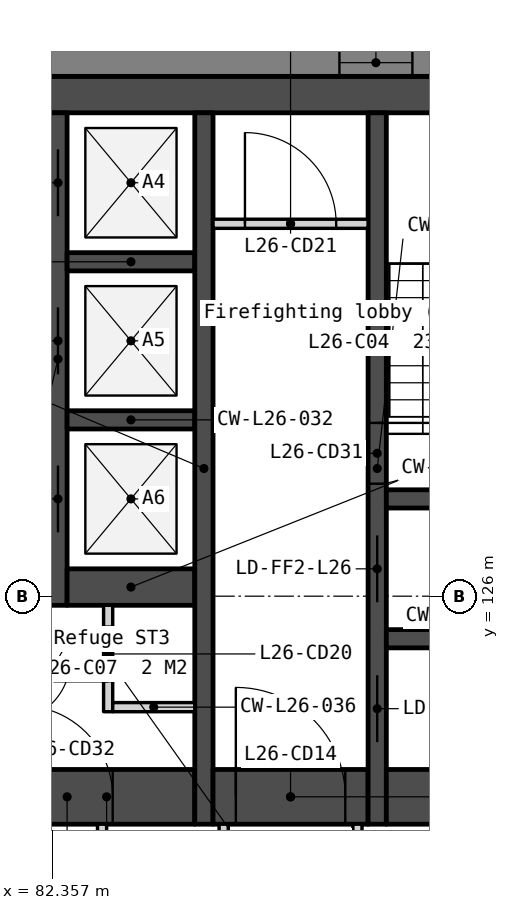
"""IFC4 building model, lengths in metres.
Left out: names, types, materials, properties, quantities, classifications, styles, units other than length and angle.
Written with IfcOpenShell. Run it as: python <this file> out.ifc"""

import sys

from ifc_helpers import new_model, si_unit, direction, frame, frame_2d, origin, place, context, subcontext, project, spatial, polyline, rectangle, outline, extrude, element, fill, save


model = new_model("IFC4")
c1 = context("Model", 3, precision=1e-05, world=origin(), true_north=direction((0.0, 1.0)))
c2 = subcontext(c1, "Body", "Model", "MODEL_VIEW")
j1 = project(units=[si_unit("LENGTHUNIT", "METRE"), si_unit("PLANEANGLEUNIT", "RADIAN")], contexts=[c1])
p1 = place(None, origin())
s1 = spatial("IfcSite", under=j1, at=p1, CompositionType="ELEMENT")
p2 = place(p1, origin())
s2 = spatial("IfcBuilding", under=s1, at=p2, CompositionType="ELEMENT")
p3 = place(p2, frame((0.0, 0.0, 106.3)))
s3 = spatial("IfcBuildingStorey", under=s2, at=p3, CompositionType="ELEMENT", Elevation=106.3)
p4 = place(p3, frame((66.0, 134.25, 0.0), z_axis=(0.0, 0.0, 1.0), x_axis=(1.0, 0.0, 0.0)))
e1 = element("IfcWall", 1, at=p4, inside=s3, PredefinedType="SOLIDWALL", context=c2, shape_type="SweptSolid", body=[
    extrude(rectangle(XDim=28.0, YDim=0.6, at=frame_2d((14.0, 0.0))), origin(), (0.0, 0.0, 1.0), 3.35),
])
p5 = place(p3, frame((81.8, 122.7, 0.0), z_axis=(0.0, 0.0, 1.0), x_axis=(1.0, 0.0, 0.0)))
e2 = element("IfcWall", 2, at=p5, inside=s3, PredefinedType="SOLIDWALL", context=c2, shape_type="SweptSolid", body=[
    extrude(rectangle(XDim=2.9, YDim=0.9, at=frame_2d((1.45, 0.0))), origin(), (0.0, 0.0, 1.0), 3.35),
])
p6 = place(p5, frame((0.05, 0.0, 0.0)))
e3 = element("IfcOpeningElement", 3, at=p6, cuts=e2, PredefinedType="OPENING", context=c2, shape_type="SweptSolid", body=[
    extrude(rectangle(XDim=1.5, YDim=2.1, at=frame_2d((0.75, 1.05))), frame((0.0, 0.46, 0.0), z_axis=(0.0, -1.0, 0.0), x_axis=(1.0, 0.0, 0.0)), (0.0, 0.0, 1.0), 0.92),
])
p7 = place(p3, frame((82.45, 133.95, 0.0), z_axis=(0.0, 0.0, 1.0), x_axis=(0.0, -1.0, 0.0)))
e4 = element("IfcWall", 4, at=p7, inside=s3, PredefinedType="SOLIDWALL", context=c2, shape_type="SweptSolid", body=[
    extrude(rectangle(XDim=8.1, YDim=0.3, at=frame_2d((4.05, 0.0))), origin(), (0.0, 0.0, 1.0), 3.35),
])
p8 = place(p7, frame((0.6, 0.0, 0.0)))
e5 = element("IfcOpeningElement", 5, at=p8, cuts=e4, PredefinedType="OPENING", context=c2, shape_type="SweptSolid", body=[
    extrude(rectangle(XDim=1.1, YDim=2.1, at=frame_2d((0.55, 1.05))), frame((0.0, 0.16, 0.0), z_axis=(0.0, -1.0, 0.0), x_axis=(1.0, 0.0, 0.0)), (0.0, 0.0, 1.0), 0.32),
])
p9 = place(p7, frame((3.2, 0.0, 0.0)))
e6 = element("IfcOpeningElement", 6, at=p9, cuts=e4, PredefinedType="OPENING", context=c2, shape_type="SweptSolid", body=[
    extrude(rectangle(XDim=1.1, YDim=2.1, at=frame_2d((0.55, 1.05))), frame((0.0, 0.16, 0.0), z_axis=(0.0, -1.0, 0.0), x_axis=(1.0, 0.0, 0.0)), (0.0, 0.0, 1.0), 0.32),
])
p10 = place(p7, frame((5.8, 0.0, 0.0)))
e7 = element("IfcOpeningElement", 7, at=p10, cuts=e4, PredefinedType="OPENING", context=c2, shape_type="SweptSolid", body=[
    extrude(rectangle(XDim=1.1, YDim=2.1, at=frame_2d((0.55, 1.05))), frame((0.0, 0.16, 0.0), z_axis=(0.0, -1.0, 0.0), x_axis=(1.0, 0.0, 0.0)), (0.0, 0.0, 1.0), 0.32),
])
for number, where, z_axis, x_axis in (
    (8, (82.6, 131.5, 0.0), (0.0, 0.0, 1.0), (1.0, 0.0, 0.0)),
    (9, (82.6, 128.9, 0.0), (0.0, 0.0, 1.0), (1.0, 0.0, 0.0)),
):
    element("IfcWall", number, at=place(p3, frame(where, z_axis=z_axis, x_axis=x_axis)), inside=s3, PredefinedType="SOLIDWALL", context=c2, shape_type="SweptSolid", body=[
        extrude(rectangle(XDim=2.1, YDim=0.3, at=frame_2d((1.05, 0.0))), origin(), (0.0, 0.0, 1.0), 3.35),
    ])
p11 = place(p3, frame((82.6, 126.15, 0.0), z_axis=(0.0, 0.0, 1.0), x_axis=(1.0, 0.0, 0.0)))
e10 = element("IfcWall", 10, at=p11, inside=s3, PredefinedType="SOLIDWALL", context=c2, shape_type="SweptSolid", body=[
    extrude(rectangle(XDim=2.1, YDim=0.6, at=frame_2d((1.05, 0.0))), origin(), (0.0, 0.0, 1.0), 3.35),
])
p12 = place(p3, frame((83.175, 122.25, 0.0), z_axis=(0.0, 0.0, 1.0), x_axis=(0.0, -1.0, 0.0)))
e11 = element("IfcWall", 11, at=p12, inside=s3, PredefinedType="PARTITIONING", context=c2, shape_type="SweptSolid", body=[
    extrude(rectangle(XDim=2.1, YDim=0.15, at=frame_2d((1.05, 0.0))), origin(), (0.0, 0.0, 1.0), 3.35),
])
p13 = place(p3, frame((83.275, 125.85, 0.0), z_axis=(0.0, 0.0, 1.0), x_axis=(0.0, -1.0, 0.0)))
e12 = element("IfcWall", 12, at=p13, inside=s3, PredefinedType="PARTITIONING", context=c2, shape_type="SweptSolid", body=[
    extrude(rectangle(XDim=1.75, YDim=0.15, at=frame_2d((0.875, 0.0))), origin(), (0.0, 0.0, 1.0), 3.35),
])
p14 = place(p13, frame((0.35, 0.0, 0.0)))
e13 = element("IfcOpeningElement", 13, at=p14, cuts=e12, PredefinedType="OPENING", context=c2, shape_type="SweptSolid", body=[
    extrude(rectangle(XDim=0.9, YDim=2.1, at=frame_2d((0.45, 1.05))), frame((0.0, 0.085, 0.0), z_axis=(0.0, -1.0, 0.0), x_axis=(1.0, 0.0, 0.0)), (0.0, 0.0, 1.0), 0.17),
])
p15 = place(p3, frame((83.35, 124.175, 0.0), z_axis=(0.0, 0.0, 1.0), x_axis=(1.0, 0.0, 0.0)))
e14 = element("IfcWall", 14, at=p15, inside=s3, PredefinedType="PARTITIONING", context=c2, shape_type="SweptSolid", body=[
    extrude(rectangle(XDim=1.35, YDim=0.15, at=frame_2d((0.675, 0.0))), origin(), (0.0, 0.0, 1.0), 3.35),
])
p16 = place(p3, frame((84.85, 133.95, 0.0), z_axis=(0.0, 0.0, 1.0), x_axis=(0.0, -1.0, 0.0)))
e15 = element("IfcWall", 15, at=p16, inside=s3, PredefinedType="SOLIDWALL", context=c2, shape_type="SweptSolid", body=[
    extrude(rectangle(XDim=11.7, YDim=0.3, at=frame_2d((5.85, 0.0))), origin(), (0.0, 0.0, 1.0), 3.35),
])
p17 = place(p3, frame((85.0, 132.125, 0.0), z_axis=(0.0, 0.0, 1.0), x_axis=(1.0, 0.0, 0.0)))
e16 = element("IfcWall", 16, at=p17, inside=s3, PredefinedType="PARTITIONING", context=c2, shape_type="SweptSolid", body=[
    extrude(rectangle(XDim=2.55, YDim=0.15, at=frame_2d((1.275, 0.0))), origin(), (0.0, 0.0, 1.0), 3.35),
])
p18 = place(p17, frame((0.525, 0.0, 0.0)))
e17 = element("IfcOpeningElement", 17, at=p18, cuts=e16, PredefinedType="OPENING", context=c2, shape_type="SweptSolid", body=[
    extrude(rectangle(XDim=1.5, YDim=2.1, at=frame_2d((0.75, 1.05))), frame((0.0, 0.085, 0.0), z_axis=(0.0, -1.0, 0.0), x_axis=(1.0, 0.0, 0.0)), (0.0, 0.0, 1.0), 0.17),
])
p19 = place(p3, frame((85.0, 122.7, 0.0), z_axis=(0.0, 0.0, 1.0), x_axis=(1.0, 0.0, 0.0)))
e18 = element("IfcWall", 18, at=p19, inside=s3, PredefinedType="SOLIDWALL", context=c2, shape_type="SweptSolid", body=[
    extrude(rectangle(XDim=2.55, YDim=0.9, at=frame_2d((1.275, 0.0))), origin(), (0.0, 0.0, 1.0), 3.35),
])
p20 = place(p19, frame((0.375, 0.0, 0.0)))
e19 = element("IfcOpeningElement", 19, at=p20, cuts=e18, PredefinedType="OPENING", context=c2, shape_type="SweptSolid", body=[
    extrude(rectangle(XDim=1.8, YDim=2.1, at=frame_2d((0.9, 1.05))), frame((0.0, 0.46, 0.0), z_axis=(0.0, -1.0, 0.0), x_axis=(1.0, 0.0, 0.0)), (0.0, 0.0, 1.0), 0.92),
])
p21 = place(p3, frame((85.175, 122.25, 0.0), z_axis=(0.0, 0.0, 1.0), x_axis=(0.0, -1.0, 0.0)))
e20 = element("IfcWall", 20, at=p21, inside=s3, PredefinedType="PARTITIONING", context=c2, shape_type="SweptSolid", body=[
    extrude(rectangle(XDim=2.1, YDim=0.15, at=frame_2d((1.05, 0.0))), origin(), (0.0, 0.0, 1.0), 3.35),
])
p22 = place(p21, frame((0.55, 0.0, 0.0)))
e21 = element("IfcOpeningElement", 21, at=p22, cuts=e20, PredefinedType="OPENING", context=c2, shape_type="SweptSolid", body=[
    extrude(rectangle(XDim=1.0, YDim=2.1, at=frame_2d((0.5, 1.05))), frame((0.0, 0.085, 0.0), z_axis=(0.0, -1.0, 0.0), x_axis=(1.0, 0.0, 0.0)), (0.0, 0.0, 1.0), 0.17),
])
p23 = place(p3, frame((87.375, 122.25, 0.0), z_axis=(0.0, 0.0, 1.0), x_axis=(0.0, -1.0, 0.0)))
e22 = element("IfcWall", 22, at=p23, inside=s3, PredefinedType="PARTITIONING", context=c2, shape_type="SweptSolid", body=[
    extrude(rectangle(XDim=2.1, YDim=0.15, at=frame_2d((1.05, 0.0))), origin(), (0.0, 0.0, 1.0), 3.35),
])
p24 = place(p3, frame((87.7, 133.95, 0.0), z_axis=(0.0, 0.0, 1.0), x_axis=(0.0, -1.0, 0.0)))
e23 = element("IfcWall", 23, at=p24, inside=s3, PredefinedType="SOLIDWALL", context=c2, shape_type="SweptSolid", body=[
    extrude(rectangle(XDim=11.7, YDim=0.3, at=frame_2d((5.85, 0.0))), origin(), (0.0, 0.0, 1.0), 3.35),
])
p25 = place(p24, frame((6.95, 0.0, 0.0)))
e24 = element("IfcOpeningElement", 24, at=p25, cuts=e23, PredefinedType="OPENING", context=c2, shape_type="SweptSolid", body=[
    extrude(rectangle(XDim=1.1, YDim=2.1, at=frame_2d((0.55, 1.05))), frame((0.0, 0.16, 0.0), z_axis=(0.0, -1.0, 0.0), x_axis=(1.0, 0.0, 0.0)), (0.0, 0.0, 1.0), 0.32),
])
p26 = place(p24, frame((5.1, 0.0, 0.0)))
e25 = element("IfcOpeningElement", 25, at=p26, cuts=e23, PredefinedType="OPENING", context=c2, shape_type="SweptSolid", body=[
    extrude(rectangle(XDim=1.0, YDim=2.1, at=frame_2d((0.5, 1.05))), frame((0.0, 0.16, 0.0), z_axis=(0.0, -1.0, 0.0), x_axis=(1.0, 0.0, 0.0)), (0.0, 0.0, 1.0), 0.32),
])
p27 = place(p24, frame((9.25, 0.0, 0.0)))
e26 = element("IfcOpeningElement", 26, at=p27, cuts=e23, PredefinedType="OPENING", context=c2, shape_type="SweptSolid", body=[
    extrude(rectangle(XDim=1.1, YDim=2.1, at=frame_2d((0.55, 1.05))), frame((0.0, 0.16, 0.0), z_axis=(0.0, -1.0, 0.0), x_axis=(1.0, 0.0, 0.0)), (0.0, 0.0, 1.0), 0.32),
])
for number, where, z_axis, x_axis in (
    (27, (87.85, 127.6, 0.0), (0.0, 0.0, 1.0), (1.0, 0.0, 0.0)),
    (28, (87.85, 125.3, 0.0), (0.0, 0.0, 1.0), (1.0, 0.0, 0.0)),
):
    element("IfcWall", number, at=place(p3, frame(where, z_axis=z_axis, x_axis=x_axis)), inside=s3, PredefinedType="SOLIDWALL", context=c2, shape_type="SweptSolid", body=[
        extrude(rectangle(XDim=2.55, YDim=0.3, at=frame_2d((1.275, 0.0))), origin(), (0.0, 0.0, 1.0), 3.35),
    ])
p28 = place(p3, frame((87.85, 122.7, 0.0), z_axis=(0.0, 0.0, 1.0), x_axis=(1.0, 0.0, 0.0)))
e29 = element("IfcWall", 29, at=p28, inside=s3, PredefinedType="SOLIDWALL", context=c2, shape_type="SweptSolid", body=[
    extrude(rectangle(XDim=2.55, YDim=0.9, at=frame_2d((1.275, 0.0))), origin(), (0.0, 0.0, 1.0), 3.35),
])
p29 = place(p3, frame((101.322, 134.775, -0.15), z_axis=(0.0, 0.0, 1.0), x_axis=(-1.0, 0.0, 0.0)))
e30 = element("IfcWall", 30, at=p29, inside=s3, PredefinedType="SOLIDWALL", context=c2, shape_type="SweptSolid", body=[
    extrude(outline(polyline([(42.643, 0.0), (42.643, 3.5), (0.0, 3.5), (0.0, 0.0), (42.643, 0.0)])), frame((0.0, 0.225, 0.0), z_axis=(0.0, -1.0, 0.0), x_axis=(1.0, 0.0, 0.0)), (0.0, 0.0, 1.0), 0.45),
])
p30 = place(p29, frame((2.814, 0.0, 1.05)))
e31 = element("IfcOpeningElement", 31, at=p30, cuts=e30, PredefinedType="OPENING", context=c2, shape_type="SweptSolid", body=[
    extrude(rectangle(XDim=1.2, YDim=1.5, at=frame_2d((0.6, 0.75))), frame((0.0, 0.235, 0.0), z_axis=(0.0, -1.0, 0.0), x_axis=(1.0, 0.0, 0.0)), (0.0, 0.0, 1.0), 0.47),
])
p31 = place(p29, frame((4.514, 0.0, 1.05)))
e32 = element("IfcOpeningElement", 32, at=p31, cuts=e30, PredefinedType="OPENING", context=c2, shape_type="SweptSolid", body=[
    extrude(rectangle(XDim=1.2, YDim=1.5, at=frame_2d((0.6, 0.75))), frame((0.0, 0.235, 0.0), z_axis=(0.0, -1.0, 0.0), x_axis=(1.0, 0.0, 0.0)), (0.0, 0.0, 1.0), 0.47),
])
p32 = place(p29, frame((11.343, 0.0, 1.05)))
e33 = element("IfcOpeningElement", 33, at=p32, cuts=e30, PredefinedType="OPENING", context=c2, shape_type="SweptSolid", body=[
    extrude(rectangle(XDim=1.2, YDim=1.5, at=frame_2d((0.6, 0.75))), frame((0.0, 0.235, 0.0), z_axis=(0.0, -1.0, 0.0), x_axis=(1.0, 0.0, 0.0)), (0.0, 0.0, 1.0), 0.47),
])
p33 = place(p29, frame((13.043, 0.0, 1.05)))
e34 = element("IfcOpeningElement", 34, at=p33, cuts=e30, PredefinedType="OPENING", context=c2, shape_type="SweptSolid", body=[
    extrude(rectangle(XDim=1.2, YDim=1.5, at=frame_2d((0.6, 0.75))), frame((0.0, 0.235, 0.0), z_axis=(0.0, -1.0, 0.0), x_axis=(1.0, 0.0, 0.0)), (0.0, 0.0, 1.0), 0.47),
])
p34 = place(p29, frame((19.872, 0.0, 1.05)))
e35 = element("IfcOpeningElement", 35, at=p34, cuts=e30, PredefinedType="OPENING", context=c2, shape_type="SweptSolid", body=[
    extrude(rectangle(XDim=1.2, YDim=1.5, at=frame_2d((0.6, 0.75))), frame((0.0, 0.235, 0.0), z_axis=(0.0, -1.0, 0.0), x_axis=(1.0, 0.0, 0.0)), (0.0, 0.0, 1.0), 0.47),
])
p35 = place(p29, frame((21.572, 0.0, 1.05)))
e36 = element("IfcOpeningElement", 36, at=p35, cuts=e30, PredefinedType="OPENING", context=c2, shape_type="SweptSolid", body=[
    extrude(rectangle(XDim=1.2, YDim=1.5, at=frame_2d((0.6, 0.75))), frame((0.0, 0.235, 0.0), z_axis=(0.0, -1.0, 0.0), x_axis=(1.0, 0.0, 0.0)), (0.0, 0.0, 1.0), 0.47),
])
p36 = place(p29, frame((28.4, 0.0, 1.05)))
e37 = element("IfcOpeningElement", 37, at=p36, cuts=e30, PredefinedType="OPENING", context=c2, shape_type="SweptSolid", body=[
    extrude(rectangle(XDim=1.2, YDim=1.5, at=frame_2d((0.6, 0.75))), frame((0.0, 0.235, 0.0), z_axis=(0.0, -1.0, 0.0), x_axis=(1.0, 0.0, 0.0)), (0.0, 0.0, 1.0), 0.47),
])
p37 = place(p29, frame((30.1, 0.0, 1.05)))
e38 = element("IfcOpeningElement", 38, at=p37, cuts=e30, PredefinedType="OPENING", context=c2, shape_type="SweptSolid", body=[
    extrude(rectangle(XDim=1.2, YDim=1.5, at=frame_2d((0.6, 0.75))), frame((0.0, 0.235, 0.0), z_axis=(0.0, -1.0, 0.0), x_axis=(1.0, 0.0, 0.0)), (0.0, 0.0, 1.0), 0.47),
])
p38 = place(p29, frame((36.929, 0.0, 1.05)))
e39 = element("IfcOpeningElement", 39, at=p38, cuts=e30, PredefinedType="OPENING", context=c2, shape_type="SweptSolid", body=[
    extrude(rectangle(XDim=1.2, YDim=1.5, at=frame_2d((0.6, 0.75))), frame((0.0, 0.235, 0.0), z_axis=(0.0, -1.0, 0.0), x_axis=(1.0, 0.0, 0.0)), (0.0, 0.0, 1.0), 0.47),
])
p39 = place(p29, frame((38.629, 0.0, 1.05)))
e40 = element("IfcOpeningElement", 40, at=p39, cuts=e30, PredefinedType="OPENING", context=c2, shape_type="SweptSolid", body=[
    extrude(rectangle(XDim=1.2, YDim=1.5, at=frame_2d((0.6, 0.75))), frame((0.0, 0.235, 0.0), z_axis=(0.0, -1.0, 0.0), x_axis=(1.0, 0.0, 0.0)), (0.0, 0.0, 1.0), 0.47),
])
p40 = place(p3, frame((82.605, 93.333, -0.15), z_axis=(0.0, 0.0, 1.0), x_axis=(0.500000478905, 0.866025127289, 0.0)))
e41 = element("IfcWall", 41, at=p40, inside=s3, PredefinedType="SOLIDWALL", context=c2, shape_type="SweptSolid", body=[
    extrude(outline(polyline([(42.643, 0.0), (42.643, 3.5), (0.0, 3.5), (0.0, 0.0), (42.643, 0.0)])), frame((0.0, 0.225, 0.0), z_axis=(0.0, -1.0, 0.0), x_axis=(1.0, 0.0, 0.0)), (0.0, 0.0, 1.0), 0.45),
])
p41 = place(p40, frame((2.814, 0.0, 1.05)))
e42 = element("IfcOpeningElement", 42, at=p41, cuts=e41, PredefinedType="OPENING", context=c2, shape_type="SweptSolid", body=[
    extrude(rectangle(XDim=1.2, YDim=1.5, at=frame_2d((0.6, 0.75))), frame((0.0, 0.235, 0.0), z_axis=(0.0, -1.0, 0.0), x_axis=(1.0, 0.0, 0.0)), (0.0, 0.0, 1.0), 0.47),
])
p42 = place(p40, frame((4.514, 0.0, 1.05)))
e43 = element("IfcOpeningElement", 43, at=p42, cuts=e41, PredefinedType="OPENING", context=c2, shape_type="SweptSolid", body=[
    extrude(rectangle(XDim=1.2, YDim=1.5, at=frame_2d((0.6, 0.75))), frame((0.0, 0.235, 0.0), z_axis=(0.0, -1.0, 0.0), x_axis=(1.0, 0.0, 0.0)), (0.0, 0.0, 1.0), 0.47),
])
p43 = place(p40, frame((11.343, 0.0, 1.05)))
e44 = element("IfcOpeningElement", 44, at=p43, cuts=e41, PredefinedType="OPENING", context=c2, shape_type="SweptSolid", body=[
    extrude(rectangle(XDim=1.2, YDim=1.5, at=frame_2d((0.6, 0.75))), frame((0.0, 0.235, 0.0), z_axis=(0.0, -1.0, 0.0), x_axis=(1.0, 0.0, 0.0)), (0.0, 0.0, 1.0), 0.47),
])
p44 = place(p40, frame((13.043, 0.0, 1.05)))
e45 = element("IfcOpeningElement", 45, at=p44, cuts=e41, PredefinedType="OPENING", context=c2, shape_type="SweptSolid", body=[
    extrude(rectangle(XDim=1.2, YDim=1.5, at=frame_2d((0.6, 0.75))), frame((0.0, 0.235, 0.0), z_axis=(0.0, -1.0, 0.0), x_axis=(1.0, 0.0, 0.0)), (0.0, 0.0, 1.0), 0.47),
])
p45 = place(p40, frame((19.872, 0.0, 1.05)))
e46 = element("IfcOpeningElement", 46, at=p45, cuts=e41, PredefinedType="OPENING", context=c2, shape_type="SweptSolid", body=[
    extrude(rectangle(XDim=1.2, YDim=1.5, at=frame_2d((0.6, 0.75))), frame((0.0, 0.235, 0.0), z_axis=(0.0, -1.0, 0.0), x_axis=(1.0, 0.0, 0.0)), (0.0, 0.0, 1.0), 0.47),
])
p46 = place(p40, frame((21.572, 0.0, 1.05)))
e47 = element("IfcOpeningElement", 47, at=p46, cuts=e41, PredefinedType="OPENING", context=c2, shape_type="SweptSolid", body=[
    extrude(rectangle(XDim=1.2, YDim=1.5, at=frame_2d((0.6, 0.75))), frame((0.0, 0.235, 0.0), z_axis=(0.0, -1.0, 0.0), x_axis=(1.0, 0.0, 0.0)), (0.0, 0.0, 1.0), 0.47),
])
p47 = place(p40, frame((28.4, 0.0, 1.05)))
e48 = element("IfcOpeningElement", 48, at=p47, cuts=e41, PredefinedType="OPENING", context=c2, shape_type="SweptSolid", body=[
    extrude(rectangle(XDim=1.2, YDim=1.5, at=frame_2d((0.6, 0.75))), frame((0.0, 0.235, 0.0), z_axis=(0.0, -1.0, 0.0), x_axis=(1.0, 0.0, 0.0)), (0.0, 0.0, 1.0), 0.47),
])
p48 = place(p40, frame((30.1, 0.0, 1.05)))
e49 = element("IfcOpeningElement", 49, at=p48, cuts=e41, PredefinedType="OPENING", context=c2, shape_type="SweptSolid", body=[
    extrude(rectangle(XDim=1.2, YDim=1.5, at=frame_2d((0.6, 0.75))), frame((0.0, 0.235, 0.0), z_axis=(0.0, -1.0, 0.0), x_axis=(1.0, 0.0, 0.0)), (0.0, 0.0, 1.0), 0.47),
])
p49 = place(p40, frame((36.929, 0.0, 1.05)))
e50 = element("IfcOpeningElement", 50, at=p49, cuts=e41, PredefinedType="OPENING", context=c2, shape_type="SweptSolid", body=[
    extrude(rectangle(XDim=1.2, YDim=1.5, at=frame_2d((0.6, 0.75))), frame((0.0, 0.235, 0.0), z_axis=(0.0, -1.0, 0.0), x_axis=(1.0, 0.0, 0.0)), (0.0, 0.0, 1.0), 0.47),
])
p50 = place(p40, frame((38.629, 0.0, 1.05)))
e51 = element("IfcOpeningElement", 51, at=p50, cuts=e41, PredefinedType="OPENING", context=c2, shape_type="SweptSolid", body=[
    extrude(rectangle(XDim=1.2, YDim=1.5, at=frame_2d((0.6, 0.75))), frame((0.0, 0.235, 0.0), z_axis=(0.0, -1.0, 0.0), x_axis=(1.0, 0.0, 0.0)), (0.0, 0.0, 1.0), 0.47),
])
p51 = place(p8, origin())
e52 = element("IfcDoor", 52, at=p51, inside=s3, OperationType="SLIDING_TO_LEFT", PredefinedType="DOOR", context=c2, shape_type="SweptSolid", body=[
    extrude(rectangle(XDim=1.1, YDim=2.1, at=frame_2d((0.55, 1.05))), frame((0.0, 0.025, 0.0), z_axis=(0.0, -1.0, 0.0), x_axis=(1.0, 0.0, 0.0)), (0.0, 0.0, 1.0), 0.05),
])
fill(e5, e52)
p52 = place(p9, origin())
e53 = element("IfcDoor", 53, at=p52, inside=s3, OperationType="SLIDING_TO_LEFT", PredefinedType="DOOR", context=c2, shape_type="SweptSolid", body=[
    extrude(rectangle(XDim=1.1, YDim=2.1, at=frame_2d((0.55, 1.05))), frame((0.0, 0.025, 0.0), z_axis=(0.0, -1.0, 0.0), x_axis=(1.0, 0.0, 0.0)), (0.0, 0.0, 1.0), 0.05),
])
fill(e6, e53)
p53 = place(p10, origin())
e54 = element("IfcDoor", 54, at=p53, inside=s3, OperationType="SLIDING_TO_LEFT", PredefinedType="DOOR", context=c2, shape_type="SweptSolid", body=[
    extrude(rectangle(XDim=1.1, YDim=2.1, at=frame_2d((0.55, 1.05))), frame((0.0, 0.025, 0.0), z_axis=(0.0, -1.0, 0.0), x_axis=(1.0, 0.0, 0.0)), (0.0, 0.0, 1.0), 0.05),
])
fill(e7, e54)
p54 = place(p25, origin())
e55 = element("IfcDoor", 55, at=p54, inside=s3, OperationType="SLIDING_TO_LEFT", PredefinedType="DOOR", context=c2, shape_type="SweptSolid", body=[
    extrude(rectangle(XDim=1.1, YDim=2.1, at=frame_2d((0.55, 1.05))), frame((0.0, 0.025, 0.0), z_axis=(0.0, -1.0, 0.0), x_axis=(1.0, 0.0, 0.0)), (0.0, 0.0, 1.0), 0.05),
])
fill(e24, e55)
p55 = place(p20, origin())
e56 = element("IfcDoor", 56, at=p55, inside=s3, OperationType="DOUBLE_DOOR_DOUBLE_SWING", PredefinedType="DOOR", context=c2, shape_type="SweptSolid", body=[
    extrude(rectangle(XDim=1.8, YDim=2.1, at=frame_2d((0.9, 1.05))), frame((0.0, 0.025, 0.0), z_axis=(0.0, -1.0, 0.0), x_axis=(1.0, 0.0, 0.0)), (0.0, 0.0, 1.0), 0.05),
])
fill(e19, e56)
p56 = place(p6, origin())
e57 = element("IfcDoor", 57, at=p56, inside=s3, OperationType="DOUBLE_DOOR_DOUBLE_SWING", PredefinedType="DOOR", context=c2, shape_type="SweptSolid", body=[
    extrude(rectangle(XDim=1.5, YDim=2.1, at=frame_2d((0.75, 1.05))), frame((0.0, 0.025, 0.0), z_axis=(0.0, -1.0, 0.0), x_axis=(1.0, 0.0, 0.0)), (0.0, 0.0, 1.0), 0.05),
])
fill(e3, e57)
p57 = place(p14, origin())
e58 = element("IfcDoor", 58, at=p57, inside=s3, OperationType="SINGLE_SWING_RIGHT", PredefinedType="DOOR", context=c2, shape_type="SweptSolid", body=[
    extrude(rectangle(XDim=0.9, YDim=2.1, at=frame_2d((0.45, 1.05))), frame((0.0, 0.025, 0.0), z_axis=(0.0, -1.0, 0.0), x_axis=(1.0, 0.0, 0.0)), (0.0, 0.0, 1.0), 0.05),
])
fill(e13, e58)
p58 = place(p18, origin())
e59 = element("IfcDoor", 59, at=p58, inside=s3, OperationType="DOUBLE_DOOR_DOUBLE_SWING", PredefinedType="DOOR", context=c2, shape_type="SweptSolid", body=[
    extrude(rectangle(XDim=1.5, YDim=2.1, at=frame_2d((0.75, 1.05))), frame((0.0, 0.025, 0.0), z_axis=(0.0, -1.0, 0.0), x_axis=(1.0, 0.0, 0.0)), (0.0, 0.0, 1.0), 0.05),
])
fill(e17, e59)
p59 = place(p26, origin())
e60 = element("IfcDoor", 60, at=p59, inside=s3, OperationType="SINGLE_SWING_LEFT", PredefinedType="DOOR", context=c2, shape_type="SweptSolid", body=[
    extrude(rectangle(XDim=1.0, YDim=2.1, at=frame_2d((0.5, 1.05))), frame((0.0, 0.025, 0.0), z_axis=(0.0, -1.0, 0.0), x_axis=(1.0, 0.0, 0.0)), (0.0, 0.0, 1.0), 0.05),
])
fill(e25, e60)
p60 = place(p27, origin())
e61 = element("IfcDoor", 61, at=p60, inside=s3, OperationType="SLIDING_TO_LEFT", PredefinedType="DOOR", context=c2, shape_type="SweptSolid", body=[
    extrude(rectangle(XDim=1.1, YDim=2.1, at=frame_2d((0.55, 1.05))), frame((0.0, 0.025, 0.0), z_axis=(0.0, -1.0, 0.0), x_axis=(1.0, 0.0, 0.0)), (0.0, 0.0, 1.0), 0.05),
])
fill(e26, e61)
p61 = place(p33, origin())
e62 = element("IfcWindow", 62, at=p61, inside=s3, PartitioningType="SINGLE_PANEL", PredefinedType="WINDOW", context=c2, shape_type="SweptSolid", body=[
    extrude(rectangle(XDim=1.2, YDim=1.5, at=frame_2d((0.6, 0.75))), frame((0.0, 0.03, 0.0), z_axis=(0.0, -1.0, 0.0), x_axis=(1.0, 0.0, 0.0)), (0.0, 0.0, 1.0), 0.06),
])
fill(e34, e62)
save(model, sys.argv[1])
